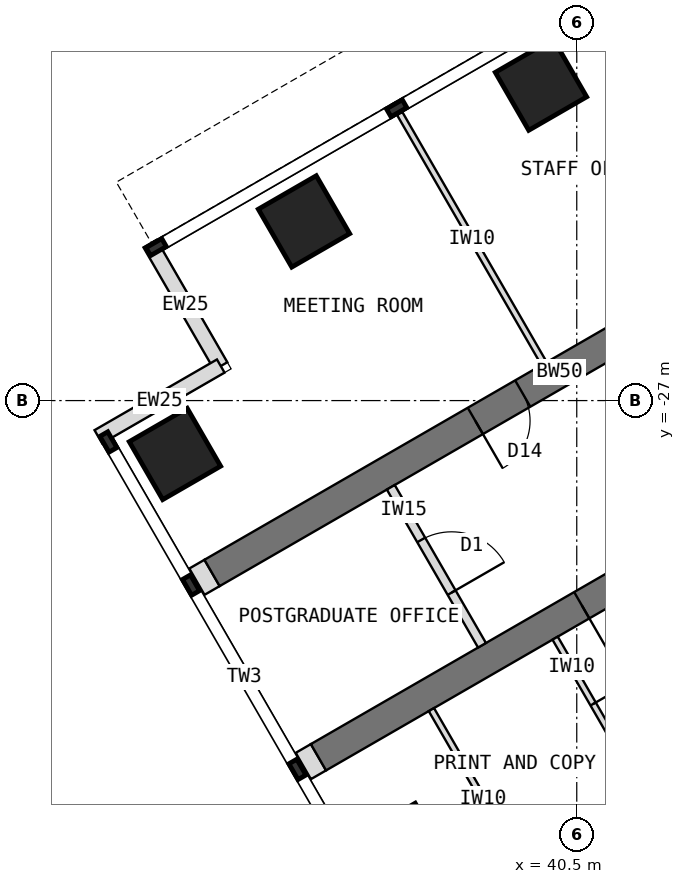
"""IFC4 building model, lengths in metres.
Left out: names, types, materials, properties, quantities, classifications, styles, units other than length and angle.
Written with IfcOpenShell. Run it as: python <this file> out.ifc"""

import sys

from ifc_helpers import new_model, si_unit, direction, frame, frame_2d, origin, origin_2d, place, context, subcontext, project, spatial, rectangle, extrude, element, fill, save


model = new_model("IFC4")
c1 = context("Model", 3, precision=1e-05, world=origin(), true_north=direction((0.0, 1.0)))
c2 = subcontext(c1, "Body", "Model", "MODEL_VIEW")
j1 = project(units=[si_unit("LENGTHUNIT", "METRE"), si_unit("PLANEANGLEUNIT", "RADIAN")], contexts=[c1])
p1 = place(None, origin())
s1 = spatial("IfcSite", under=j1, at=p1, CompositionType="ELEMENT")
p2 = place(p1, origin())
s2 = spatial("IfcBuilding", under=s1, at=p2, CompositionType="ELEMENT")
p3 = place(p2, frame((0.0, 0.0, 230.5)))
s3 = spatial("IfcBuildingStorey", under=s2, at=p3, CompositionType="ELEMENT", Elevation=230.5)
p4 = place(p3, frame((47.684, -26.266, 0.0), z_axis=(0.0, 0.0, 1.0), x_axis=(-0.866027579429, -0.499996231654, 0.0)))
e1 = element("IfcWall", 1, at=p4, inside=s3, PredefinedType="SHEAR", context=c2, shape_type="SweptSolid", body=[
    extrude(rectangle(XDim=13.2, YDim=0.5, at=frame_2d((6.6, 0.0))), origin(), (0.0, 0.0, 1.0), 4.0),
])
p5 = place(p4, frame((0.55, 0.0, 0.0)))
e2 = element("IfcOpeningElement", 2, at=p5, cuts=e1, PredefinedType="OPENING", context=c2, shape_type="SweptSolid", body=[
    extrude(rectangle(XDim=0.9, YDim=2.1, at=frame_2d((0.45, 1.05))), frame((0.0, 0.26, 0.0), z_axis=(0.0, -1.0, 0.0), x_axis=(1.0, 0.0, 0.0)), (0.0, 0.0, 1.0), 0.52),
])
p6 = place(p4, frame((7.3, 0.0, 0.0)))
e3 = element("IfcOpeningElement", 3, at=p6, cuts=e1, PredefinedType="OPENING", context=c2, shape_type="SweptSolid", body=[
    extrude(rectangle(XDim=0.9, YDim=2.1, at=frame_2d((0.45, 1.05))), frame((0.0, 0.26, 0.0), z_axis=(0.0, -1.0, 0.0), x_axis=(1.0, 0.0, 0.0)), (0.0, 0.0, 1.0), 0.52),
])
p7 = place(p3, frame((45.934, -23.234, 0.0), z_axis=(0.0, 0.0, 1.0), x_axis=(-0.866019570528, -0.500010103361, 0.0)))
e4 = element("IfcWall", 4, at=p7, inside=s3, PredefinedType="SHEAR", context=c2, shape_type="SweptSolid", body=[
    extrude(rectangle(XDim=13.2, YDim=0.5, at=frame_2d((6.6, 0.0))), origin(), (0.0, 0.0, 1.0), 4.0),
])
p8 = place(p7, frame((0.55, 0.0, 0.0)))
e5 = element("IfcOpeningElement", 5, at=p8, cuts=e4, PredefinedType="OPENING", context=c2, shape_type="SweptSolid", body=[
    extrude(rectangle(XDim=0.9, YDim=2.1, at=frame_2d((0.45, 1.05))), frame((0.0, 0.26, 0.0), z_axis=(0.0, -1.0, 0.0), x_axis=(1.0, 0.0, 0.0)), (0.0, 0.0, 1.0), 0.52),
])
p9 = place(p7, frame((7.3, 0.0, 0.0)))
e6 = element("IfcOpeningElement", 6, at=p9, cuts=e4, PredefinedType="OPENING", context=c2, shape_type="SweptSolid", body=[
    extrude(rectangle(XDim=0.9, YDim=2.1, at=frame_2d((0.45, 1.05))), frame((0.0, 0.26, 0.0), z_axis=(0.0, -1.0, 0.0), x_axis=(1.0, 0.0, 0.0)), (0.0, 0.0, 1.0), 0.52),
])
for number, where, z_axis, x_axis in (
    (7, (39.912, -21.804, 0.0), (0.0, 0.0, 1.0), (0.866, 0.5, 0.0)),
    (8, (36.014, -24.054, 0.0), (0.0, 0.0, 1.0), (0.866, 0.5, 0.0)),
    (9, (37.642, -34.373, 0.0), (0.0, 0.0, 1.0), (0.866, 0.5, 0.0)),
    (10, (33.892, -27.877, 0.0), (0.0, 0.0, 1.0), (0.866, 0.5, 0.0)),
):
    element("IfcColumn", number, at=place(p3, frame(where, z_axis=z_axis, x_axis=x_axis)), inside=s3, PredefinedType="COLUMN", context=c2, shape_type="SweptSolid", body=[
        extrude(rectangle(XDim=1.1, YDim=1.1, at=origin_2d()), origin(), (0.0, 0.0, 1.0), 4.0),
    ])
for number, where, z_axis, x_axis in (
    (11, (33.483, -24.419, 0.0), (0.0, 0.0, 1.0), (0.5, -0.866, 0.0)),
    (12, (34.645, -26.432, 0.0), (0.0, 0.0, 1.0), (-0.866, -0.5, 0.0)),
):
    element("IfcWall", number, at=place(p3, frame(where, z_axis=z_axis, x_axis=x_axis)), inside=s3, PredefinedType="STANDARD", context=c2, shape_type="SweptSolid", body=[
        extrude(rectangle(XDim=2.325, YDim=0.25, at=frame_2d((1.163, 0.0))), origin(), (0.0, 0.0, 1.0), 3.8),
    ])
for number, where, z_axis, x_axis in (
    (13, (36.252, -32.865, 0.0), (0.0, 0.0, 1.0), (-0.866, -0.5, 0.0)),
    (14, (34.502, -29.834, 0.0), (0.0, 0.0, 1.0), (-0.866, -0.5, 0.0)),
):
    element("IfcWall", number, at=place(p3, frame(where, z_axis=z_axis, x_axis=x_axis)), inside=s3, PredefinedType="PARTITIONING", context=c2, shape_type="SweptSolid", body=[
        extrude(rectangle(XDim=0.288, YDim=0.5, at=frame_2d((0.144, 0.0))), origin(), (0.0, 0.0, 1.0), 3.8),
    ])
p10 = place(p3, frame((40.144, -30.907, 0.0), z_axis=(0.0, 0.0, 1.0), x_axis=(0.499977295307, -0.866038511948, 0.0)))
e15 = element("IfcWall", 15, at=p10, inside=s3, PredefinedType="PARTITIONING", context=c2, shape_type="SweptSolid", body=[
    extrude(rectangle(XDim=3.4, YDim=0.1, at=frame_2d((1.7, 0.0))), origin(), (0.0, 0.0, 1.0), 3.8),
])
p11 = place(p10, frame((1.25, 0.0, 0.0)))
e16 = element("IfcOpeningElement", 16, at=p11, cuts=e15, PredefinedType="OPENING", context=c2, shape_type="SweptSolid", body=[
    extrude(rectangle(XDim=0.9, YDim=2.1, at=frame_2d((0.45, 1.05))), frame((0.0, 0.06, 0.0), z_axis=(0.0, -1.0, 0.0), x_axis=(1.0, 0.0, 0.0)), (0.0, 0.0, 1.0), 0.12),
])
p12 = place(p3, frame((38.109, -32.082, 0.0), z_axis=(0.0, 0.0, 1.0), x_axis=(0.499977295307, -0.866038511948, 0.0)))
e17 = element("IfcWall", 17, at=p12, inside=s3, PredefinedType="PARTITIONING", context=c2, shape_type="SweptSolid", body=[
    extrude(rectangle(XDim=3.4, YDim=0.1, at=frame_2d((1.7, 0.0))), origin(), (0.0, 0.0, 1.0), 3.8),
])
p13 = place(p3, frame((39.963, -26.393, 0.0), z_axis=(0.0, 0.0, 1.0), x_axis=(-0.499986429846, 0.866033238375, 0.0)))
e18 = element("IfcWall", 18, at=p13, inside=s3, PredefinedType="PARTITIONING", context=c2, shape_type="SweptSolid", body=[
    extrude(rectangle(XDim=4.75, YDim=0.1, at=frame_2d((2.375, 0.0))), origin(), (0.0, 0.0, 1.0), 3.8),
])
p14 = place(p3, frame((37.442, -28.426, 0.0), z_axis=(0.0, 0.0, 1.0), x_axis=(0.50002537861, -0.866010750942, 0.0)))
e19 = element("IfcWall", 19, at=p14, inside=s3, PredefinedType="PARTITIONING", context=c2, shape_type="SweptSolid", body=[
    extrude(rectangle(XDim=3.0, YDim=0.15, at=frame_2d((1.5, 0.0))), origin(), (0.0, 0.0, 1.0), 3.8),
])
p15 = place(p14, frame((1.0, 0.0, 0.0)))
e20 = element("IfcOpeningElement", 20, at=p15, cuts=e19, PredefinedType="OPENING", context=c2, shape_type="SweptSolid", body=[
    extrude(rectangle(XDim=1.0, YDim=2.1, at=frame_2d((0.5, 1.05))), frame((0.0, 0.085, 0.0), z_axis=(0.0, -1.0, 0.0), x_axis=(1.0, 0.0, 0.0)), (0.0, 0.0, 1.0), 0.17),
])
p16 = place(p11, origin())
e21 = element("IfcDoor", 21, at=p16, inside=s3, OperationType="SINGLE_SWING_LEFT", PredefinedType="DOOR", context=c2, shape_type="SweptSolid", body=[
    extrude(rectangle(XDim=0.9, YDim=2.1, at=frame_2d((0.45, 1.05))), frame((0.0, 0.025, 0.0), z_axis=(0.0, -1.0, 0.0), x_axis=(1.0, 0.0, 0.0)), (0.0, 0.0, 1.0), 0.05),
])
fill(e16, e21)
p17 = place(p15, origin())
e22 = element("IfcDoor", 22, at=p17, inside=s3, OperationType="SINGLE_SWING_RIGHT", PredefinedType="DOOR", context=c2, shape_type="SweptSolid", body=[
    extrude(rectangle(XDim=1.0, YDim=2.1, at=frame_2d((0.5, 1.05))), frame((0.0, 0.025, 0.0), z_axis=(0.0, -1.0, 0.0), x_axis=(1.0, 0.0, 0.0)), (0.0, 0.0, 1.0), 0.05),
])
fill(e20, e22)
p18 = place(p6, origin())
e23 = element("IfcDoor", 23, at=p18, inside=s3, OperationType="SINGLE_SWING_RIGHT", PredefinedType="DOOR", context=c2, shape_type="SweptSolid", body=[
    extrude(rectangle(XDim=0.9, YDim=2.1, at=frame_2d((0.45, 1.05))), frame((0.0, 0.025, 0.0), z_axis=(0.0, -1.0, 0.0), x_axis=(1.0, 0.0, 0.0)), (0.0, 0.0, 1.0), 0.05),
])
fill(e3, e23)
p19 = place(p9, origin())
e24 = element("IfcDoor", 24, at=p19, inside=s3, OperationType="SINGLE_SWING_RIGHT", PredefinedType="DOOR", context=c2, shape_type="SweptSolid", body=[
    extrude(rectangle(XDim=0.9, YDim=2.1, at=frame_2d((0.45, 1.05))), frame((0.0, 0.025, 0.0), z_axis=(0.0, -1.0, 0.0), x_axis=(1.0, 0.0, 0.0)), (0.0, 0.0, 1.0), 0.05),
])
fill(e6, e24)
save(model, sys.argv[1])
